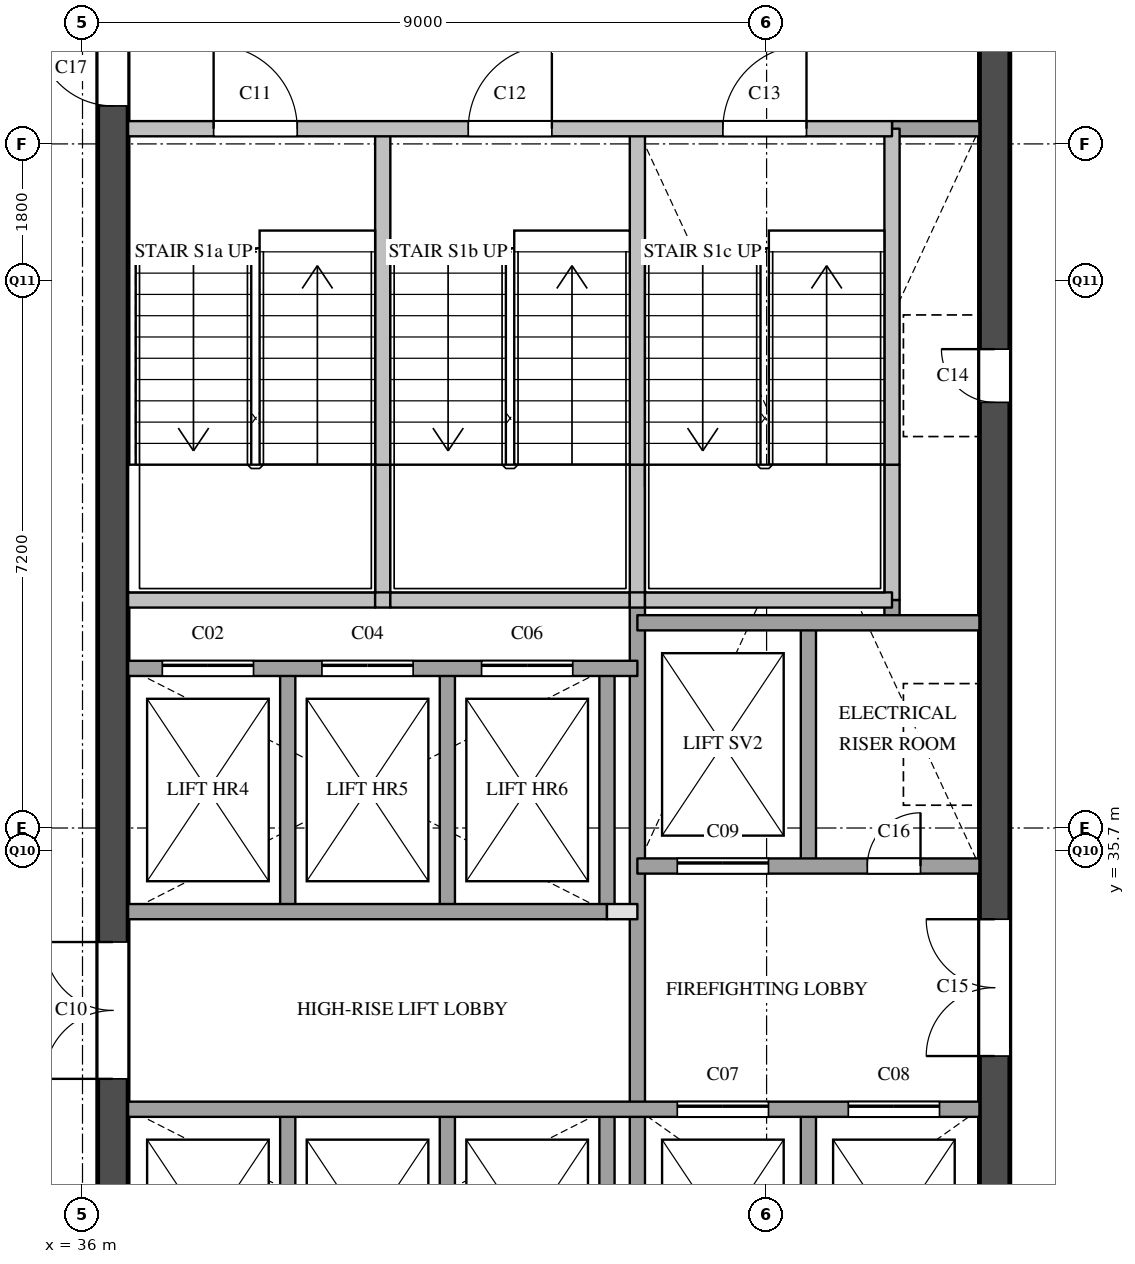
"""IFC4 building model, lengths in metres.
Left out: names, types, materials, properties, quantities, classifications, styles, units other than length and angle.
Written with IfcOpenShell. Run it as: python <this file> out.ifc"""

import sys

from ifc_helpers import new_model, si_unit, direction, frame, frame_2d, origin, place, context, subcontext, project, spatial, rectangle, extrude, element, fill, save


model = new_model("IFC4")
c1 = context("Model", 3, precision=1e-05, world=origin(), true_north=direction((0.0, 1.0)))
c2 = subcontext(c1, "Body", "Model", "MODEL_VIEW")
j1 = project(units=[si_unit("LENGTHUNIT", "METRE"), si_unit("PLANEANGLEUNIT", "RADIAN")], contexts=[c1])
p1 = place(None, origin())
s1 = spatial("IfcSite", under=j1, at=p1, CompositionType="ELEMENT")
p2 = place(p1, origin())
s2 = spatial("IfcBuilding", under=s1, at=p2, CompositionType="ELEMENT")
p3 = place(p2, frame((0.0, 0.0, 269.6)))
s3 = spatial("IfcBuildingStorey", under=s2, at=p3, CompositionType="ELEMENT", Elevation=269.6)
p4 = place(p3, frame((36.4, 29.1, 0.0), z_axis=(0.0, 0.0, 1.0), x_axis=(0.0, 1.0, 0.0)))
e1 = element("IfcWall", 1, at=p4, inside=s3, PredefinedType="SHEAR", context=c2, shape_type="SweptSolid", body=[
    extrude(rectangle(XDim=20.3, YDim=0.4, at=frame_2d((10.15, 0.0))), origin(), (0.0, 0.0, 1.0), 3.6),
])
p5 = place(p4, frame((3.6, 0.0, 0.0)))
e2 = element("IfcOpeningElement", 2, at=p5, cuts=e1, PredefinedType="OPENING", context=c2, shape_type="SweptSolid", body=[
    extrude(rectangle(XDim=1.8, YDim=2.1, at=frame_2d((0.9, 1.05))), frame((0.0, 0.21, 0.0), z_axis=(0.0, -1.0, 0.0), x_axis=(1.0, 0.0, 0.0)), (0.0, 0.0, 1.0), 0.42),
])
p6 = place(p4, frame((16.4, 0.0, 0.0)))
e3 = element("IfcOpeningElement", 3, at=p6, cuts=e1, PredefinedType="OPENING", context=c2, shape_type="SweptSolid", body=[
    extrude(rectangle(XDim=1.0, YDim=2.1, at=frame_2d((0.5, 1.05))), frame((0.0, 0.21, 0.0), z_axis=(0.0, -1.0, 0.0), x_axis=(1.0, 0.0, 0.0)), (0.0, 0.0, 1.0), 0.42),
])
p7 = place(p3, frame((48.0, 29.1, 0.0), z_axis=(0.0, 0.0, 1.0), x_axis=(0.0, 1.0, 0.0)))
e4 = element("IfcWall", 4, at=p7, inside=s3, PredefinedType="SHEAR", context=c2, shape_type="SweptSolid", body=[
    extrude(rectangle(XDim=20.3, YDim=0.4, at=frame_2d((10.15, 0.0))), origin(), (0.0, 0.0, 1.0), 3.6),
])
p8 = place(p7, frame((12.5, 0.0, 0.0)))
e5 = element("IfcOpeningElement", 5, at=p8, cuts=e4, PredefinedType="OPENING", context=c2, shape_type="SweptSolid", body=[
    extrude(rectangle(XDim=0.7, YDim=2.1, at=frame_2d((0.35, 1.05))), frame((0.0, 0.21, 0.0), z_axis=(0.0, -1.0, 0.0), x_axis=(1.0, 0.0, 0.0)), (0.0, 0.0, 1.0), 0.42),
])
p9 = place(p7, frame((3.9, 0.0, 0.0)))
e6 = element("IfcOpeningElement", 6, at=p9, cuts=e4, PredefinedType="OPENING", context=c2, shape_type="SweptSolid", body=[
    extrude(rectangle(XDim=1.8, YDim=2.1, at=frame_2d((0.9, 1.05))), frame((0.0, 0.21, 0.0), z_axis=(0.0, -1.0, 0.0), x_axis=(1.0, 0.0, 0.0)), (0.0, 0.0, 1.0), 0.42),
])
p10 = place(p3, frame((38.7, 29.1, 0.0), z_axis=(0.0, 0.0, 1.0), x_axis=(0.0, 1.0, 0.0)))
e7 = element("IfcWall", 7, at=p10, inside=s3, PredefinedType="SOLIDWALL", context=c2, shape_type="SweptSolid", body=[
    extrude(rectangle(XDim=3.2, YDim=0.2, at=frame_2d((1.6, 0.0))), origin(), (0.0, 0.0, 1.0), 3.6),
])
p11 = place(p3, frame((38.7, 34.9, 0.0), z_axis=(0.0, 0.0, 1.0), x_axis=(0.0, 1.0, 0.0)))
e8 = element("IfcWall", 8, at=p11, inside=s3, PredefinedType="SOLIDWALL", context=c2, shape_type="SweptSolid", body=[
    extrude(rectangle(XDim=3.2, YDim=0.2, at=frame_2d((1.6, 0.0))), origin(), (0.0, 0.0, 1.0), 3.6),
])
p12 = place(p3, frame((39.95, 39.0, 0.0), z_axis=(0.0, 0.0, 1.0), x_axis=(0.0, 1.0, 0.0)))
e9 = element("IfcWall", 9, at=p12, inside=s3, PredefinedType="SOLIDWALL", context=c2, shape_type="SweptSolid", body=[
    extrude(rectangle(XDim=1.78, YDim=0.2, at=frame_2d((0.89, 0.0))), origin(), (0.0, 0.0, 1.0), 3.6),
])
p13 = place(p3, frame((39.95, 40.78, 0.0), z_axis=(0.0, 0.0, 1.0), x_axis=(0.0, 1.0, 0.0)))
e10 = element("IfcWall", 10, at=p13, inside=s3, PredefinedType="SOLIDWALL", context=c2, shape_type="SweptSolid", body=[
    extrude(rectangle(XDim=4.42, YDim=0.2, at=frame_2d((2.21, 0.0))), origin(), (0.0, 0.0, 1.0), 3.6),
])
p14 = place(p3, frame((40.8, 29.1, 0.0), z_axis=(0.0, 0.0, 1.0), x_axis=(0.0, 1.0, 0.0)))
e11 = element("IfcWall", 11, at=p14, inside=s3, PredefinedType="SOLIDWALL", context=c2, shape_type="SweptSolid", body=[
    extrude(rectangle(XDim=3.2, YDim=0.2, at=frame_2d((1.6, 0.0))), origin(), (0.0, 0.0, 1.0), 3.6),
])
p15 = place(p3, frame((40.8, 34.9, 0.0), z_axis=(0.0, 0.0, 1.0), x_axis=(0.0, 1.0, 0.0)))
e12 = element("IfcWall", 12, at=p15, inside=s3, PredefinedType="SOLIDWALL", context=c2, shape_type="SweptSolid", body=[
    extrude(rectangle(XDim=3.2, YDim=0.2, at=frame_2d((1.6, 0.0))), origin(), (0.0, 0.0, 1.0), 3.6),
])
p16 = place(p3, frame((42.9, 29.1, 0.0), z_axis=(0.0, 0.0, 1.0), x_axis=(0.0, 1.0, 0.0)))
e13 = element("IfcWall", 13, at=p16, inside=s3, PredefinedType="SOLIDWALL", context=c2, shape_type="SweptSolid", body=[
    extrude(rectangle(XDim=3.2, YDim=0.2, at=frame_2d((1.6, 0.0))), origin(), (0.0, 0.0, 1.0), 3.6),
])
p17 = place(p3, frame((42.9, 34.9, 0.0), z_axis=(0.0, 0.0, 1.0), x_axis=(0.0, 1.0, 0.0)))
e14 = element("IfcWall", 14, at=p17, inside=s3, PredefinedType="SOLIDWALL", context=c2, shape_type="SweptSolid", body=[
    extrude(rectangle(XDim=3.2, YDim=0.2, at=frame_2d((1.6, 0.0))), origin(), (0.0, 0.0, 1.0), 3.6),
])
p18 = place(p3, frame((43.3, 29.1, 0.0), z_axis=(0.0, 0.0, 1.0), x_axis=(0.0, 1.0, 0.0)))
e15 = element("IfcWall", 15, at=p18, inside=s3, PredefinedType="SOLIDWALL", context=c2, shape_type="SweptSolid", body=[
    extrude(rectangle(XDim=9.9, YDim=0.2, at=frame_2d((4.95, 0.0))), origin(), (0.0, 0.0, 1.0), 3.6),
])
p19 = place(p3, frame((43.3, 39.0, 0.0), z_axis=(0.0, 0.0, 1.0), x_axis=(0.0, 1.0, 0.0)))
e16 = element("IfcWall", 16, at=p19, inside=s3, PredefinedType="SOLIDWALL", context=c2, shape_type="SweptSolid", body=[
    extrude(rectangle(XDim=1.78, YDim=0.2, at=frame_2d((0.89, 0.0))), origin(), (0.0, 0.0, 1.0), 3.6),
])
p20 = place(p3, frame((43.3, 40.78, 0.0), z_axis=(0.0, 0.0, 1.0), x_axis=(0.0, 1.0, 0.0)))
e17 = element("IfcWall", 17, at=p20, inside=s3, PredefinedType="SOLIDWALL", context=c2, shape_type="SweptSolid", body=[
    extrude(rectangle(XDim=4.42, YDim=0.2, at=frame_2d((2.21, 0.0))), origin(), (0.0, 0.0, 1.0), 3.6),
])
for number, where, z_axis, x_axis in (
    (18, (45.55, 29.1, 0.0), (0.0, 0.0, 1.0), (0.0, 1.0, 0.0)),
    (19, (45.55, 35.5, 0.0), (0.0, 0.0, 1.0), (0.0, 1.0, 0.0)),
):
    element("IfcWall", number, at=place(p3, frame(where, z_axis=z_axis, x_axis=x_axis)), inside=s3, PredefinedType="SOLIDWALL", context=c2, shape_type="SweptSolid", body=[
        extrude(rectangle(XDim=3.2, YDim=0.2, at=frame_2d((1.6, 0.0))), origin(), (0.0, 0.0, 1.0), 3.6),
    ])
p21 = place(p3, frame((46.65, 38.7, 0.0), z_axis=(0.0, 0.0, 1.0), x_axis=(0.0, 1.0, 0.0)))
e20 = element("IfcWall", 20, at=p21, inside=s3, PredefinedType="SOLIDWALL", context=c2, shape_type="SweptSolid", body=[
    extrude(rectangle(XDim=0.3, YDim=0.2, at=frame_2d((0.15, 0.0))), origin(), (0.0, 0.0, 1.0), 3.6),
])
p22 = place(p3, frame((46.65, 39.0, 0.0), z_axis=(0.0, 0.0, 1.0), x_axis=(0.0, 1.0, 0.0)))
e21 = element("IfcWall", 21, at=p22, inside=s3, PredefinedType="SOLIDWALL", context=c2, shape_type="SweptSolid", body=[
    extrude(rectangle(XDim=1.78, YDim=0.2, at=frame_2d((0.89, 0.0))), origin(), (0.0, 0.0, 1.0), 3.6),
])
p23 = place(p3, frame((46.65, 40.78, 0.0), z_axis=(0.0, 0.0, 1.0), x_axis=(0.0, 1.0, 0.0)))
e22 = element("IfcWall", 22, at=p23, inside=s3, PredefinedType="SOLIDWALL", context=c2, shape_type="SweptSolid", body=[
    extrude(rectangle(XDim=4.42, YDim=0.2, at=frame_2d((2.21, 0.0))), origin(), (0.0, 0.0, 1.0), 3.6),
])
p24 = place(p3, frame((36.6, 32.3, 0.0), z_axis=(0.0, 0.0, 1.0), x_axis=(1.0, 0.0, 0.0)))
e23 = element("IfcWall", 23, at=p24, inside=s3, PredefinedType="SOLIDWALL", context=c2, shape_type="SweptSolid", body=[
    extrude(rectangle(XDim=11.2, YDim=0.2, at=frame_2d((5.6, 0.0))), origin(), (0.0, 0.0, 1.0), 3.6),
])
p25 = place(p24, frame((7.225, 0.0, 0.0)))
e24 = element("IfcOpeningElement", 24, at=p25, cuts=e23, PredefinedType="OPENING", context=c2, shape_type="SweptSolid", body=[
    extrude(rectangle(XDim=1.2, YDim=2.1, at=frame_2d((0.6, 1.05))), frame((0.0, 0.11, 0.0), z_axis=(0.0, -1.0, 0.0), x_axis=(1.0, 0.0, 0.0)), (0.0, 0.0, 1.0), 0.22),
])
p26 = place(p24, frame((9.475, 0.0, 0.0)))
e25 = element("IfcOpeningElement", 25, at=p26, cuts=e23, PredefinedType="OPENING", context=c2, shape_type="SweptSolid", body=[
    extrude(rectangle(XDim=1.2, YDim=2.1, at=frame_2d((0.6, 1.05))), frame((0.0, 0.11, 0.0), z_axis=(0.0, -1.0, 0.0), x_axis=(1.0, 0.0, 0.0)), (0.0, 0.0, 1.0), 0.22),
])
p27 = place(p3, frame((42.9, 34.9, 0.0), z_axis=(0.0, 0.0, 1.0), x_axis=(1.0, 0.0, 0.0)))
e26 = element("IfcWall", 26, at=p27, inside=s3, PredefinedType="PARTITIONING", context=c2, shape_type="SweptSolid", body=[
    extrude(rectangle(XDim=0.4, YDim=0.2, at=frame_2d((0.2, 0.0))), origin(), (0.0, 0.0, 1.0), 3.6),
])
p28 = place(p3, frame((36.6, 34.9, 0.0), z_axis=(0.0, 0.0, 1.0), x_axis=(1.0, 0.0, 0.0)))
e27 = element("IfcWall", 27, at=p28, inside=s3, PredefinedType="SOLIDWALL", context=c2, shape_type="SweptSolid", body=[
    extrude(rectangle(XDim=6.3, YDim=0.2, at=frame_2d((3.15, 0.0))), origin(), (0.0, 0.0, 1.0), 3.6),
])
p29 = place(p3, frame((43.3, 35.5, 0.0), z_axis=(0.0, 0.0, 1.0), x_axis=(1.0, 0.0, 0.0)))
e28 = element("IfcWall", 28, at=p29, inside=s3, PredefinedType="SOLIDWALL", context=c2, shape_type="SweptSolid", body=[
    extrude(rectangle(XDim=4.5, YDim=0.2, at=frame_2d((2.25, 0.0))), origin(), (0.0, 0.0, 1.0), 3.6),
])
p30 = place(p29, frame((0.525, 0.0, 0.0)))
e29 = element("IfcOpeningElement", 29, at=p30, cuts=e28, PredefinedType="OPENING", context=c2, shape_type="SweptSolid", body=[
    extrude(rectangle(XDim=1.2, YDim=2.1, at=frame_2d((0.6, 1.05))), frame((0.0, 0.11, 0.0), z_axis=(0.0, -1.0, 0.0), x_axis=(1.0, 0.0, 0.0)), (0.0, 0.0, 1.0), 0.22),
])
p31 = place(p29, frame((3.025, 0.0, 0.0)))
e30 = element("IfcOpeningElement", 30, at=p31, cuts=e28, PredefinedType="OPENING", context=c2, shape_type="SweptSolid", body=[
    extrude(rectangle(XDim=0.7, YDim=2.1, at=frame_2d((0.35, 1.05))), frame((0.0, 0.11, 0.0), z_axis=(0.0, -1.0, 0.0), x_axis=(1.0, 0.0, 0.0)), (0.0, 0.0, 1.0), 0.22),
])
p32 = place(p3, frame((36.6, 38.1, 0.0), z_axis=(0.0, 0.0, 1.0), x_axis=(1.0, 0.0, 0.0)))
e31 = element("IfcWall", 31, at=p32, inside=s3, PredefinedType="SOLIDWALL", context=c2, shape_type="SweptSolid", body=[
    extrude(rectangle(XDim=6.7, YDim=0.2, at=frame_2d((3.35, 0.0))), origin(), (0.0, 0.0, 1.0), 3.6),
])
p33 = place(p32, frame((0.45, 0.0, 0.0)))
e32 = element("IfcOpeningElement", 32, at=p33, cuts=e31, PredefinedType="OPENING", context=c2, shape_type="SweptSolid", body=[
    extrude(rectangle(XDim=1.2, YDim=2.1, at=frame_2d((0.6, 1.05))), frame((0.0, 0.11, 0.0), z_axis=(0.0, -1.0, 0.0), x_axis=(1.0, 0.0, 0.0)), (0.0, 0.0, 1.0), 0.22),
])
p34 = place(p32, frame((2.55, 0.0, 0.0)))
e33 = element("IfcOpeningElement", 33, at=p34, cuts=e31, PredefinedType="OPENING", context=c2, shape_type="SweptSolid", body=[
    extrude(rectangle(XDim=1.2, YDim=2.1, at=frame_2d((0.6, 1.05))), frame((0.0, 0.11, 0.0), z_axis=(0.0, -1.0, 0.0), x_axis=(1.0, 0.0, 0.0)), (0.0, 0.0, 1.0), 0.22),
])
p35 = place(p32, frame((4.65, 0.0, 0.0)))
e34 = element("IfcOpeningElement", 34, at=p35, cuts=e31, PredefinedType="OPENING", context=c2, shape_type="SweptSolid", body=[
    extrude(rectangle(XDim=1.2, YDim=2.1, at=frame_2d((0.6, 1.05))), frame((0.0, 0.11, 0.0), z_axis=(0.0, -1.0, 0.0), x_axis=(1.0, 0.0, 0.0)), (0.0, 0.0, 1.0), 0.22),
])
p36 = place(p3, frame((43.3, 38.7, 0.0), z_axis=(0.0, 0.0, 1.0), x_axis=(1.0, 0.0, 0.0)))
e35 = element("IfcWall", 35, at=p36, inside=s3, PredefinedType="SOLIDWALL", context=c2, shape_type="SweptSolid", body=[
    extrude(rectangle(XDim=4.5, YDim=0.2, at=frame_2d((2.25, 0.0))), origin(), (0.0, 0.0, 1.0), 3.6),
])
p37 = place(p3, frame((36.6, 39.0, 0.0), z_axis=(0.0, 0.0, 1.0), x_axis=(1.0, 0.0, 0.0)))
e36 = element("IfcWall", 36, at=p37, inside=s3, PredefinedType="SOLIDWALL", context=c2, shape_type="SweptSolid", body=[
    extrude(rectangle(XDim=3.25, YDim=0.2, at=frame_2d((1.625, 0.0))), origin(), (0.0, 0.0, 1.0), 3.6),
])
p38 = place(p3, frame((39.85, 39.0, 0.0), z_axis=(0.0, 0.0, 1.0), x_axis=(1.0, 0.0, 0.0)))
e37 = element("IfcWall", 37, at=p38, inside=s3, PredefinedType="SOLIDWALL", context=c2, shape_type="SweptSolid", body=[
    extrude(rectangle(XDim=0.2, YDim=0.2, at=frame_2d((0.1, 0.0))), origin(), (0.0, 0.0, 1.0), 3.6),
])
p39 = place(p3, frame((40.05, 39.0, 0.0), z_axis=(0.0, 0.0, 1.0), x_axis=(1.0, 0.0, 0.0)))
e38 = element("IfcWall", 38, at=p39, inside=s3, PredefinedType="SOLIDWALL", context=c2, shape_type="SweptSolid", body=[
    extrude(rectangle(XDim=3.15, YDim=0.2, at=frame_2d((1.575, 0.0))), origin(), (0.0, 0.0, 1.0), 3.6),
])
p40 = place(p3, frame((43.2, 39.0, 0.0), z_axis=(0.0, 0.0, 1.0), x_axis=(1.0, 0.0, 0.0)))
e39 = element("IfcWall", 39, at=p40, inside=s3, PredefinedType="SOLIDWALL", context=c2, shape_type="SweptSolid", body=[
    extrude(rectangle(XDim=0.2, YDim=0.2, at=frame_2d((0.1, 0.0))), origin(), (0.0, 0.0, 1.0), 3.6),
])
p41 = place(p3, frame((43.4, 39.0, 0.0), z_axis=(0.0, 0.0, 1.0), x_axis=(1.0, 0.0, 0.0)))
e40 = element("IfcWall", 40, at=p41, inside=s3, PredefinedType="SOLIDWALL", context=c2, shape_type="SweptSolid", body=[
    extrude(rectangle(XDim=3.25, YDim=0.2, at=frame_2d((1.625, 0.0))), origin(), (0.0, 0.0, 1.0), 3.6),
])
p42 = place(p3, frame((46.65, 45.2, 0.0), z_axis=(0.0, 0.0, 1.0), x_axis=(1.0, 0.0, 0.0)))
e41 = element("IfcWall", 41, at=p42, inside=s3, PredefinedType="SOLIDWALL", context=c2, shape_type="SweptSolid", body=[
    extrude(rectangle(XDim=1.15, YDim=0.2, at=frame_2d((0.575, 0.0))), origin(), (0.0, 0.0, 1.0), 3.6),
])
p43 = place(p3, frame((36.6, 45.2, 0.0), z_axis=(0.0, 0.0, 1.0), x_axis=(1.0, 0.0, 0.0)))
e42 = element("IfcWall", 42, at=p43, inside=s3, PredefinedType="SOLIDWALL", context=c2, shape_type="SweptSolid", body=[
    extrude(rectangle(XDim=10.05, YDim=0.2, at=frame_2d((5.025, 0.0))), origin(), (0.0, 0.0, 1.0), 3.6),
])
p44 = place(p43, frame((1.125, 0.0, 0.0)))
e43 = element("IfcOpeningElement", 43, at=p44, cuts=e42, PredefinedType="OPENING", context=c2, shape_type="SweptSolid", body=[
    extrude(rectangle(XDim=1.1, YDim=2.1, at=frame_2d((0.55, 1.05))), frame((0.0, 0.11, 0.0), z_axis=(0.0, -1.0, 0.0), x_axis=(1.0, 0.0, 0.0)), (0.0, 0.0, 1.0), 0.22),
])
p45 = place(p43, frame((4.475, 0.0, 0.0)))
e44 = element("IfcOpeningElement", 44, at=p45, cuts=e42, PredefinedType="OPENING", context=c2, shape_type="SweptSolid", body=[
    extrude(rectangle(XDim=1.1, YDim=2.1, at=frame_2d((0.55, 1.05))), frame((0.0, 0.11, 0.0), z_axis=(0.0, -1.0, 0.0), x_axis=(1.0, 0.0, 0.0)), (0.0, 0.0, 1.0), 0.22),
])
p46 = place(p43, frame((7.825, 0.0, 0.0)))
e45 = element("IfcOpeningElement", 45, at=p46, cuts=e42, PredefinedType="OPENING", context=c2, shape_type="SweptSolid", body=[
    extrude(rectangle(XDim=1.1, YDim=2.1, at=frame_2d((0.55, 1.05))), frame((0.0, 0.11, 0.0), z_axis=(0.0, -1.0, 0.0), x_axis=(1.0, 0.0, 0.0)), (0.0, 0.0, 1.0), 0.22),
])
p47 = place(p33, origin())
e46 = element("IfcDoor", 46, at=p47, inside=s3, OperationType="SLIDING_TO_LEFT", PredefinedType="DOOR", context=c2, shape_type="SweptSolid", body=[
    extrude(rectangle(XDim=1.2, YDim=2.1, at=frame_2d((0.6, 1.05))), frame((0.0, 0.025, 0.0), z_axis=(0.0, -1.0, 0.0), x_axis=(1.0, 0.0, 0.0)), (0.0, 0.0, 1.0), 0.05),
])
fill(e32, e46)
p48 = place(p34, origin())
e47 = element("IfcDoor", 47, at=p48, inside=s3, OperationType="SLIDING_TO_LEFT", PredefinedType="DOOR", context=c2, shape_type="SweptSolid", body=[
    extrude(rectangle(XDim=1.2, YDim=2.1, at=frame_2d((0.6, 1.05))), frame((0.0, 0.025, 0.0), z_axis=(0.0, -1.0, 0.0), x_axis=(1.0, 0.0, 0.0)), (0.0, 0.0, 1.0), 0.05),
])
fill(e33, e47)
p49 = place(p35, origin())
e48 = element("IfcDoor", 48, at=p49, inside=s3, OperationType="SLIDING_TO_LEFT", PredefinedType="DOOR", context=c2, shape_type="SweptSolid", body=[
    extrude(rectangle(XDim=1.2, YDim=2.1, at=frame_2d((0.6, 1.05))), frame((0.0, 0.025, 0.0), z_axis=(0.0, -1.0, 0.0), x_axis=(1.0, 0.0, 0.0)), (0.0, 0.0, 1.0), 0.05),
])
fill(e34, e48)
p50 = place(p25, origin())
e49 = element("IfcDoor", 49, at=p50, inside=s3, OperationType="SLIDING_TO_LEFT", PredefinedType="DOOR", context=c2, shape_type="SweptSolid", body=[
    extrude(rectangle(XDim=1.2, YDim=2.1, at=frame_2d((0.6, 1.05))), frame((0.0, 0.025, 0.0), z_axis=(0.0, -1.0, 0.0), x_axis=(1.0, 0.0, 0.0)), (0.0, 0.0, 1.0), 0.05),
])
fill(e24, e49)
p51 = place(p26, origin())
e50 = element("IfcDoor", 50, at=p51, inside=s3, OperationType="SLIDING_TO_LEFT", PredefinedType="DOOR", context=c2, shape_type="SweptSolid", body=[
    extrude(rectangle(XDim=1.2, YDim=2.1, at=frame_2d((0.6, 1.05))), frame((0.0, 0.025, 0.0), z_axis=(0.0, -1.0, 0.0), x_axis=(1.0, 0.0, 0.0)), (0.0, 0.0, 1.0), 0.05),
])
fill(e25, e50)
p52 = place(p30, origin())
e51 = element("IfcDoor", 51, at=p52, inside=s3, OperationType="SLIDING_TO_LEFT", PredefinedType="DOOR", context=c2, shape_type="SweptSolid", body=[
    extrude(rectangle(XDim=1.2, YDim=2.1, at=frame_2d((0.6, 1.05))), frame((0.0, 0.025, 0.0), z_axis=(0.0, -1.0, 0.0), x_axis=(1.0, 0.0, 0.0)), (0.0, 0.0, 1.0), 0.05),
])
fill(e29, e51)
p53 = place(p5, origin())
e52 = element("IfcDoor", 52, at=p53, inside=s3, OperationType="DOUBLE_DOOR_SINGLE_SWING", PredefinedType="DOOR", context=c2, shape_type="SweptSolid", body=[
    extrude(rectangle(XDim=1.8, YDim=2.1, at=frame_2d((0.9, 1.05))), frame((0.0, 0.025, 0.0), z_axis=(0.0, -1.0, 0.0), x_axis=(1.0, 0.0, 0.0)), (0.0, 0.0, 1.0), 0.05),
])
fill(e2, e52)
p54 = place(p44, origin())
e53 = element("IfcDoor", 53, at=p54, inside=s3, OperationType="SINGLE_SWING_LEFT", PredefinedType="DOOR", context=c2, shape_type="SweptSolid", body=[
    extrude(rectangle(XDim=1.1, YDim=2.1, at=frame_2d((0.55, 1.05))), frame((0.0, 0.025, 0.0), z_axis=(0.0, -1.0, 0.0), x_axis=(1.0, 0.0, 0.0)), (0.0, 0.0, 1.0), 0.05),
])
fill(e43, e53)
p55 = place(p45, origin())
e54 = element("IfcDoor", 54, at=p55, inside=s3, OperationType="SINGLE_SWING_RIGHT", PredefinedType="DOOR", context=c2, shape_type="SweptSolid", body=[
    extrude(rectangle(XDim=1.1, YDim=2.1, at=frame_2d((0.55, 1.05))), frame((0.0, 0.025, 0.0), z_axis=(0.0, -1.0, 0.0), x_axis=(1.0, 0.0, 0.0)), (0.0, 0.0, 1.0), 0.05),
])
fill(e44, e54)
p56 = place(p46, origin())
e55 = element("IfcDoor", 55, at=p56, inside=s3, OperationType="SINGLE_SWING_RIGHT", PredefinedType="DOOR", context=c2, shape_type="SweptSolid", body=[
    extrude(rectangle(XDim=1.1, YDim=2.1, at=frame_2d((0.55, 1.05))), frame((0.0, 0.025, 0.0), z_axis=(0.0, -1.0, 0.0), x_axis=(1.0, 0.0, 0.0)), (0.0, 0.0, 1.0), 0.05),
])
fill(e45, e55)
p57 = place(p8, origin())
e56 = element("IfcDoor", 56, at=p57, inside=s3, OperationType="SINGLE_SWING_RIGHT", PredefinedType="DOOR", context=c2, shape_type="SweptSolid", body=[
    extrude(rectangle(XDim=0.7, YDim=2.1, at=frame_2d((0.35, 1.05))), frame((0.0, 0.025, 0.0), z_axis=(0.0, -1.0, 0.0), x_axis=(1.0, 0.0, 0.0)), (0.0, 0.0, 1.0), 0.05),
])
fill(e5, e56)
p58 = place(p9, origin())
e57 = element("IfcDoor", 57, at=p58, inside=s3, OperationType="DOUBLE_DOOR_SINGLE_SWING", PredefinedType="DOOR", context=c2, shape_type="SweptSolid", body=[
    extrude(rectangle(XDim=1.8, YDim=2.1, at=frame_2d((0.9, 1.05))), frame((0.0, 0.025, 0.0), z_axis=(0.0, -1.0, 0.0), x_axis=(1.0, 0.0, 0.0)), (0.0, 0.0, 1.0), 0.05),
])
fill(e6, e57)
p59 = place(p31, origin())
e58 = element("IfcDoor", 58, at=p59, inside=s3, OperationType="SINGLE_SWING_RIGHT", PredefinedType="DOOR", context=c2, shape_type="SweptSolid", body=[
    extrude(rectangle(XDim=0.7, YDim=2.1, at=frame_2d((0.35, 1.05))), frame((0.0, 0.025, 0.0), z_axis=(0.0, -1.0, 0.0), x_axis=(1.0, 0.0, 0.0)), (0.0, 0.0, 1.0), 0.05),
])
fill(e30, e58)
p60 = place(p6, origin())
e59 = element("IfcDoor", 59, at=p60, inside=s3, OperationType="SINGLE_SWING_RIGHT", PredefinedType="DOOR", context=c2, shape_type="SweptSolid", body=[
    extrude(rectangle(XDim=1.0, YDim=2.1, at=frame_2d((0.5, 1.05))), frame((0.0, 0.025, 0.0), z_axis=(0.0, -1.0, 0.0), x_axis=(1.0, 0.0, 0.0)), (0.0, 0.0, 1.0), 0.05),
])
fill(e3, e59)
save(model, sys.argv[1])
